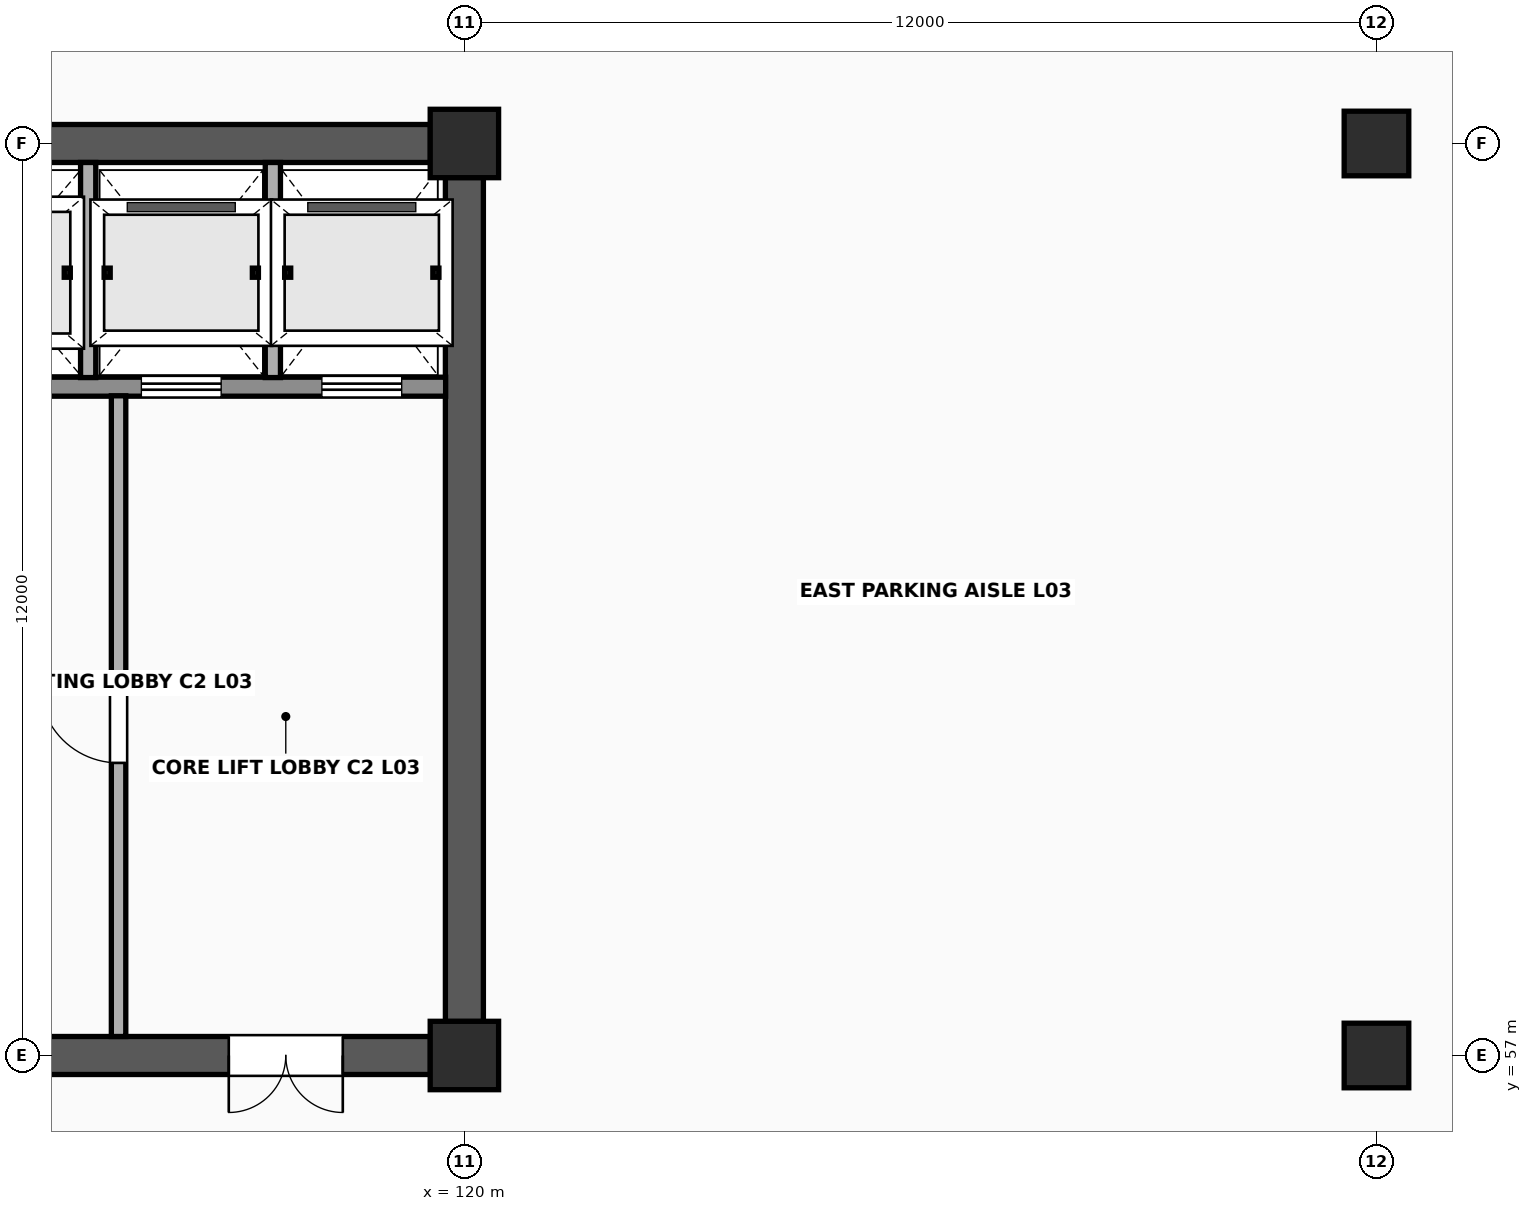
"""IFC4 building model, lengths in metres.
Left out: names, types, materials, properties, quantities, classifications, styles, units other than length and angle.
Written with IfcOpenShell. Run it as: python <this file> out.ifc"""

import sys

from ifc_helpers import new_model, si_unit, direction, frame, frame_2d, origin, origin_2d, place, context, subcontext, project, spatial, rectangle, extrude, element, fill, save


model = new_model("IFC4")
c1 = context("Model", 3, precision=1e-05, world=origin(), true_north=direction((0.0, 1.0)))
c2 = subcontext(c1, "Body", "Model", "MODEL_VIEW")
j1 = project(units=[si_unit("LENGTHUNIT", "METRE"), si_unit("PLANEANGLEUNIT", "RADIAN")], contexts=[c1])
p1 = place(None, origin())
s1 = spatial("IfcSite", under=j1, at=p1, CompositionType="ELEMENT")
p2 = place(p1, origin())
s2 = spatial("IfcBuilding", under=s1, at=p2, CompositionType="ELEMENT")
p3 = place(p2, frame((0.0, 0.0, 13.4)))
s3 = spatial("IfcBuildingStorey", under=s2, at=p3, CompositionType="ELEMENT", Elevation=13.4)
for number, where, z_axis, x_axis in (
    (1, (120.0, 57.0, 0.0), (0.0, 0.0, 1.0), (1.0, 0.0, 0.0)),
    (2, (120.0, 69.0, 0.0), (0.0, 0.0, 1.0), (1.0, 0.0, 0.0)),
):
    element("IfcColumn", number, at=place(p3, frame(where, z_axis=z_axis, x_axis=x_axis)), inside=s3, PredefinedType="COLUMN", context=c2, shape_type="SweptSolid", body=[
        extrude(rectangle(XDim=0.9, YDim=0.9, at=origin_2d()), origin(), (0.0, 0.0, 1.0), 3.8),
    ])
for number, where, z_axis, x_axis in (
    (3, (132.0, 57.0, 0.0), (0.0, 0.0, 1.0), (1.0, 0.0, 0.0)),
    (4, (132.0, 69.0, 0.0), (0.0, 0.0, 1.0), (1.0, 0.0, 0.0)),
):
    element("IfcColumn", number, at=place(p3, frame(where, z_axis=z_axis, x_axis=x_axis)), inside=s3, PredefinedType="COLUMN", context=c2, shape_type="SweptSolid", body=[
        extrude(rectangle(XDim=0.85, YDim=0.85, at=origin_2d()), origin(), (0.0, 0.0, 1.0), 3.8),
    ])
p4 = place(p3, frame((108.447, 57.0, 0.0), z_axis=(0.0, 0.0, 1.0), x_axis=(1.0, 0.0, 0.0)))
e5 = element("IfcWall", 5, at=p4, inside=s3, PredefinedType="SHEAR", context=c2, shape_type="SweptSolid", body=[
    extrude(rectangle(XDim=11.106, YDim=0.5, at=frame_2d((5.553, 0.0))), origin(), (0.0, 0.0, 1.0), 3.618),
])
p5 = place(p4, frame((4.753, 0.0, 0.0)))
e6 = element("IfcOpeningElement", 6, at=p5, cuts=e5, PredefinedType="OPENING", context=c2, shape_type="SweptSolid", body=[
    extrude(rectangle(XDim=1.2, YDim=2.2, at=frame_2d((0.6, 1.1))), frame((0.0, 0.265, 0.0), z_axis=(0.0, -1.0, 0.0), x_axis=(1.0, 0.0, 0.0)), (0.0, 0.0, 1.0), 0.53),
])
p6 = place(p4, frame((8.453, 0.0, 0.0)))
e7 = element("IfcOpeningElement", 7, at=p6, cuts=e5, PredefinedType="OPENING", context=c2, shape_type="SweptSolid", body=[
    extrude(rectangle(XDim=1.5, YDim=2.25, at=frame_2d((0.75, 1.125))), frame((0.0, 0.265, 0.0), z_axis=(0.0, -1.0, 0.0), x_axis=(1.0, 0.0, 0.0)), (0.0, 0.0, 1.0), 0.53),
])
for number, where, z_axis, x_axis in (
    (8, (108.447, 69.0, 0.0), (0.0, 0.0, 1.0), (1.0, 0.0, 0.0)),
    (9, (120.0, 57.447, 0.0), (0.0, 0.0, 1.0), (0.0, 1.0, 0.0)),
):
    element("IfcWall", number, at=place(p3, frame(where, z_axis=z_axis, x_axis=x_axis)), inside=s3, PredefinedType="SHEAR", context=c2, shape_type="SweptSolid", body=[
        extrude(rectangle(XDim=11.106, YDim=0.5, at=frame_2d((5.553, 0.0))), origin(), (0.0, 0.0, 1.0), 3.618),
    ])
p7 = place(p3, frame((112.597, 65.8, 0.0), z_axis=(0.0, 0.0, 1.0), x_axis=(1.0, 0.0, 0.0)))
e10 = element("IfcWall", 10, at=p7, inside=s3, PredefinedType="SOLIDWALL", context=c2, shape_type="SweptSolid", body=[
    extrude(rectangle(XDim=7.156, YDim=0.25, at=frame_2d((3.578, 0.0))), origin(), (0.0, 0.0, 1.0), 3.618),
])
p8 = place(p7, frame((0.653, 0.0, 0.0)))
e11 = element("IfcOpeningElement", 11, at=p8, cuts=e10, PredefinedType="OPENING", context=c2, shape_type="SweptSolid", body=[
    extrude(rectangle(XDim=1.1, YDim=2.24, at=frame_2d((0.55, 1.12))), frame((0.0, 0.14, 0.0), z_axis=(0.0, -1.0, 0.0), x_axis=(1.0, 0.0, 0.0)), (0.0, 0.0, 1.0), 0.28),
])
p9 = place(p7, frame((3.153, 0.0, 0.0)))
e12 = element("IfcOpeningElement", 12, at=p9, cuts=e10, PredefinedType="OPENING", context=c2, shape_type="SweptSolid", body=[
    extrude(rectangle(XDim=1.05, YDim=2.2, at=frame_2d((0.525, 1.1))), frame((0.0, 0.14, 0.0), z_axis=(0.0, -1.0, 0.0), x_axis=(1.0, 0.0, 0.0)), (0.0, 0.0, 1.0), 0.28),
])
p10 = place(p7, frame((5.528, 0.0, 0.0)))
e13 = element("IfcOpeningElement", 13, at=p10, cuts=e10, PredefinedType="OPENING", context=c2, shape_type="SweptSolid", body=[
    extrude(rectangle(XDim=1.05, YDim=2.2, at=frame_2d((0.525, 1.1))), frame((0.0, 0.14, 0.0), z_axis=(0.0, -1.0, 0.0), x_axis=(1.0, 0.0, 0.0)), (0.0, 0.0, 1.0), 0.28),
])
for number, where, z_axis, x_axis in (
    (14, (115.05, 65.92, 0.0), (0.0, 0.0, 1.0), (0.0, 1.0, 0.0)),
    (15, (117.48, 65.92, 0.0), (0.0, 0.0, 1.0), (0.0, 1.0, 0.0)),
):
    element("IfcWall", number, at=place(p3, frame(where, z_axis=z_axis, x_axis=x_axis)), inside=s3, PredefinedType="SOLIDWALL", context=c2, shape_type="SweptSolid", body=[
        extrude(rectangle(XDim=2.83, YDim=0.2, at=frame_2d((1.415, 0.0))), origin(), (0.0, 0.0, 1.0), 3.608),
    ])
p11 = place(p3, frame((115.45, 57.25, 0.0), z_axis=(0.0, 0.0, 1.0), x_axis=(0.0, 1.0, 0.0)))
e16 = element("IfcWall", 16, at=p11, inside=s3, PredefinedType="SOLIDWALL", context=c2, shape_type="SweptSolid", body=[
    extrude(rectangle(XDim=8.43, YDim=0.19, at=frame_2d((4.215, 0.0))), origin(), (0.0, 0.0, 1.0), 3.608),
])
p12 = place(p11, frame((3.6, 0.0, 0.0)))
e17 = element("IfcOpeningElement", 17, at=p12, cuts=e16, PredefinedType="OPENING", context=c2, shape_type="SweptSolid", body=[
    extrude(rectangle(XDim=1.04, YDim=2.18, at=frame_2d((0.52, 1.09))), frame((0.0, 0.11, 0.0), z_axis=(0.0, -1.0, 0.0), x_axis=(1.0, 0.0, 0.0)), (0.0, 0.0, 1.0), 0.22),
])
p13 = place(p12, origin())
e18 = element("IfcDoor", 18, at=p13, inside=s3, OperationType="SINGLE_SWING_RIGHT", PredefinedType="DOOR", context=c2, shape_type="SweptSolid", body=[
    extrude(rectangle(XDim=1.04, YDim=2.18, at=frame_2d((0.52, 1.09))), frame((0.0, 0.025, 0.0), z_axis=(0.0, -1.0, 0.0), x_axis=(1.0, 0.0, 0.0)), (0.0, 0.0, 1.0), 0.05),
])
fill(e17, e18)
p14 = place(p6, origin())
e19 = element("IfcDoor", 19, at=p14, inside=s3, OperationType="DOUBLE_DOOR_SINGLE_SWING", PredefinedType="DOOR", context=c2, shape_type="SweptSolid", body=[
    extrude(rectangle(XDim=1.5, YDim=2.25, at=frame_2d((0.75, 1.125))), frame((0.0, 0.025, 0.0), z_axis=(0.0, -1.0, 0.0), x_axis=(1.0, 0.0, 0.0)), (0.0, 0.0, 1.0), 0.05),
])
fill(e7, e19)
p15 = place(p9, origin())
e20 = element("IfcDoor", 20, at=p15, inside=s3, OperationType="SLIDING_TO_LEFT", PredefinedType="USERDEFINED", context=c2, shape_type="SweptSolid", body=[
    extrude(rectangle(XDim=1.05, YDim=2.2, at=frame_2d((0.525, 1.1))), frame((0.0, 0.025, 0.0), z_axis=(0.0, -1.0, 0.0), x_axis=(1.0, 0.0, 0.0)), (0.0, 0.0, 1.0), 0.05),
])
fill(e12, e20)
p16 = place(p10, origin())
e21 = element("IfcDoor", 21, at=p16, inside=s3, OperationType="SLIDING_TO_LEFT", PredefinedType="USERDEFINED", context=c2, shape_type="SweptSolid", body=[
    extrude(rectangle(XDim=1.05, YDim=2.2, at=frame_2d((0.525, 1.1))), frame((0.0, 0.025, 0.0), z_axis=(0.0, -1.0, 0.0), x_axis=(1.0, 0.0, 0.0)), (0.0, 0.0, 1.0), 0.05),
])
fill(e13, e21)
save(model, sys.argv[1])
